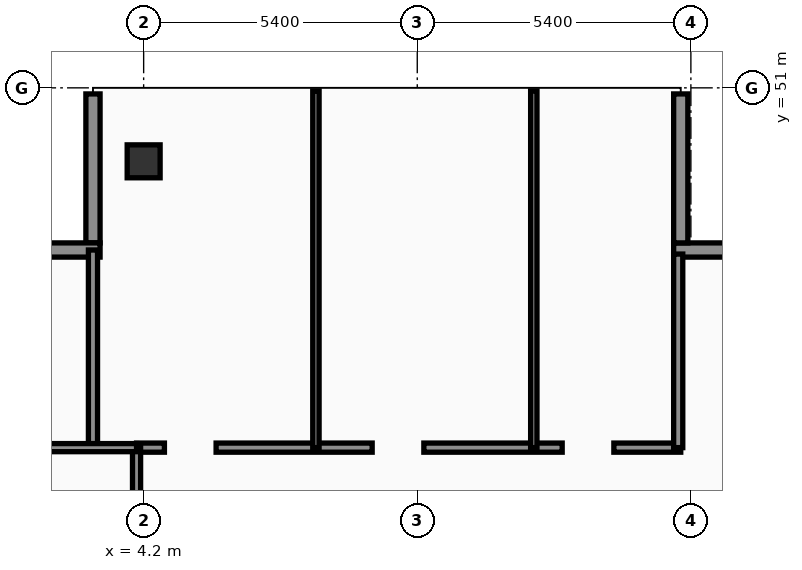
"""IFC4 building model, lengths in metres.
Left out: names, types, materials, properties, quantities, classifications, styles, units other than length and angle.
Written with IfcOpenShell. Run it as: python <this file> out.ifc"""

import sys

from ifc_helpers import new_model, si_unit, direction, frame, frame_2d, origin, origin_2d, place, context, subcontext, project, spatial, rectangle, hollow_rectangle, extrude, element, fill, save


model = new_model("IFC4")
c1 = context("Model", 3, precision=1e-05, world=origin(), true_north=direction((0.0, 1.0)))
c2 = subcontext(c1, "Body", "Model", "MODEL_VIEW")
j1 = project(units=[si_unit("LENGTHUNIT", "METRE"), si_unit("PLANEANGLEUNIT", "RADIAN")], contexts=[c1])
p1 = place(None, origin())
s1 = spatial("IfcSite", under=j1, at=p1, CompositionType="ELEMENT")
p2 = place(p1, origin())
s2 = spatial("IfcBuilding", under=s1, at=p2, CompositionType="ELEMENT")
p3 = place(p2, frame((0.0, 0.0, 311.5)))
s3 = spatial("IfcBuildingStorey", under=s2, at=p3, CompositionType="ELEMENT", Elevation=311.5)
p4 = place(p3, frame((4.2, 49.55, 0.0), z_axis=(0.0, 0.0, 1.0), x_axis=(1.0, 0.0, 0.0)))
e1 = element("IfcColumn", 1, at=p4, inside=s3, PredefinedType="COLUMN", context=c2, shape_type="SweptSolid", body=[
    extrude(hollow_rectangle(XDim=0.65, YDim=0.65, WallThickness=0.028, at=origin_2d()), origin(), (0.0, 0.0, 1.0), 4.26),
])
p5 = place(p3, frame((17.9, 47.8, 0.0), z_axis=(0.0, 0.0, 1.0), x_axis=(-1.0, 0.0, 0.0)))
e2 = element("IfcWall", 2, at=p5, inside=s3, PredefinedType="SOLIDWALL", context=c2, shape_type="SweptSolid", body=[
    extrude(rectangle(XDim=3.24, YDim=0.28, at=frame_2d((1.62, 0.0))), origin(), (0.0, 0.0, 1.0), 4.26),
])
p6 = place(p3, frame((14.8, 47.94, 0.0), z_axis=(0.0, 0.0, 1.0), x_axis=(0.0, 1.0, 0.0)))
e3 = element("IfcWall", 3, at=p6, inside=s3, PredefinedType="SOLIDWALL", context=c2, shape_type="SweptSolid", body=[
    extrude(rectangle(XDim=2.94, YDim=0.28, at=frame_2d((1.47, 0.0))), origin(), (0.0, 0.0, 1.0), 4.26),
])
p7 = place(p3, frame((3.2, 50.88, 0.0), z_axis=(0.0, 0.0, 1.0), x_axis=(0.0, -1.0, 0.0)))
e4 = element("IfcWall", 4, at=p7, inside=s3, PredefinedType="SOLIDWALL", context=c2, shape_type="SweptSolid", body=[
    extrude(rectangle(XDim=2.94, YDim=0.28, at=frame_2d((1.47, 0.0))), origin(), (0.0, 0.0, 1.0), 3.79),
])
p8 = place(p3, frame((3.34, 47.8, 0.0), z_axis=(0.0, 0.0, 1.0), x_axis=(-1.0, 0.0, 0.0)))
e5 = element("IfcWall", 5, at=p8, inside=s3, PredefinedType="SOLIDWALL", context=c2, shape_type="SweptSolid", body=[
    extrude(rectangle(XDim=3.22, YDim=0.28, at=frame_2d((1.61, 0.0))), origin(), (0.0, 0.0, 1.0), 3.79),
])
p9 = place(p3, frame((3.2, 43.9, 0.0), z_axis=(0.0, 0.0, 1.0), x_axis=(0.0, 1.0, 0.0)))
e6 = element("IfcWall", 6, at=p9, inside=s3, PredefinedType="PARTITIONING", context=c2, shape_type="SweptSolid", body=[
    extrude(rectangle(XDim=3.9, YDim=0.18, at=frame_2d((1.95, 0.0))), origin(), (0.0, 0.0, 1.0), 4.26),
])
p10 = place(p3, frame((4.06, 43.9, 0.0), z_axis=(0.0, 0.0, 1.0), x_axis=(1.0, 0.0, 0.0)))
e7 = element("IfcWall", 7, at=p10, inside=s3, PredefinedType="PARTITIONING", context=c2, shape_type="SweptSolid", body=[
    extrude(rectangle(XDim=10.74, YDim=0.18, at=frame_2d((5.37, 0.0))), origin(), (0.0, 0.0, 1.0), 3.69),
])
p11 = place(p10, frame((0.55, 0.0, 0.0)))
e8 = element("IfcOpeningElement", 8, at=p11, cuts=e7, PredefinedType="OPENING", context=c2, shape_type="SweptSolid", body=[
    extrude(rectangle(XDim=1.02, YDim=2.2, at=frame_2d((0.51, 1.1))), frame((0.0, 0.1, 0.0), z_axis=(0.0, -1.0, 0.0), x_axis=(1.0, 0.0, 0.0)), (0.0, 0.0, 1.0), 0.2),
])
p12 = place(p10, frame((4.65, 0.0, 0.0)))
e9 = element("IfcOpeningElement", 9, at=p12, cuts=e7, PredefinedType="OPENING", context=c2, shape_type="SweptSolid", body=[
    extrude(rectangle(XDim=1.02, YDim=2.2, at=frame_2d((0.51, 1.1))), frame((0.0, 0.1, 0.0), z_axis=(0.0, -1.0, 0.0), x_axis=(1.0, 0.0, 0.0)), (0.0, 0.0, 1.0), 0.2),
])
p13 = place(p10, frame((8.4, 0.0, 0.0)))
e10 = element("IfcOpeningElement", 10, at=p13, cuts=e7, PredefinedType="OPENING", context=c2, shape_type="SweptSolid", body=[
    extrude(rectangle(XDim=1.02, YDim=2.2, at=frame_2d((0.51, 1.1))), frame((0.0, 0.1, 0.0), z_axis=(0.0, -1.0, 0.0), x_axis=(1.0, 0.0, 0.0)), (0.0, 0.0, 1.0), 0.2),
])
p14 = place(p3, frame((4.06, 38.4, 0.0), z_axis=(0.0, 0.0, 1.0), x_axis=(0.0, 1.0, 0.0)))
e11 = element("IfcWall", 11, at=p14, inside=s3, PredefinedType="PARTITIONING", context=c2, shape_type="SweptSolid", body=[
    extrude(rectangle(XDim=5.5, YDim=0.16, at=frame_2d((2.75, 0.0))), origin(), (0.0, 0.0, 1.0), 3.69),
])
p15 = place(p14, frame((3.2, 0.0, 0.0)))
e12 = element("IfcOpeningElement", 12, at=p15, cuts=e11, PredefinedType="OPENING", context=c2, shape_type="SweptSolid", body=[
    extrude(rectangle(XDim=1.02, YDim=2.2, at=frame_2d((0.51, 1.1))), frame((0.0, 0.09, 0.0), z_axis=(0.0, -1.0, 0.0), x_axis=(1.0, 0.0, 0.0)), (0.0, 0.0, 1.0), 0.18),
])
p16 = place(p3, frame((0.08, 43.9, 0.0), z_axis=(0.0, 0.0, 1.0), x_axis=(1.0, 0.0, 0.0)))
e13 = element("IfcWall", 13, at=p16, inside=s3, PredefinedType="PARTITIONING", context=c2, shape_type="SweptSolid", body=[
    extrude(rectangle(XDim=3.98, YDim=0.16, at=frame_2d((1.99, 0.0))), origin(), (0.0, 0.0, 1.0), 3.69),
])
p17 = place(p3, frame((14.75, 43.9, 0.0), z_axis=(0.0, 0.0, 1.0), x_axis=(0.0, 1.0, 0.0)))
e14 = element("IfcWall", 14, at=p17, inside=s3, PredefinedType="PARTITIONING", context=c2, shape_type="SweptSolid", body=[
    extrude(rectangle(XDim=3.82, YDim=0.18, at=frame_2d((1.91, 0.0))), origin(), (0.0, 0.0, 1.0), 3.79),
])
for number, where, z_axis, x_axis in (
    (15, (7.6, 43.9, 0.0), (0.0, 0.0, 1.0), (0.0, 1.0, 0.0)),
    (16, (11.9, 43.9, 0.0), (0.0, 0.0, 1.0), (0.0, 1.0, 0.0)),
):
    element("IfcWall", number, at=place(p3, frame(where, z_axis=z_axis, x_axis=x_axis)), inside=s3, PredefinedType="PARTITIONING", context=c2, shape_type="SweptSolid", body=[
        extrude(rectangle(XDim=7.04, YDim=0.125, at=frame_2d((3.52, 0.0))), origin(), (0.0, 0.0, 1.0), 3.79),
    ])
p18 = place(p11, origin())
e17 = element("IfcDoor", 17, at=p18, inside=s3, OperationType="SINGLE_SWING_LEFT", PredefinedType="DOOR", context=c2, shape_type="SweptSolid", body=[
    extrude(rectangle(XDim=1.02, YDim=2.2, at=frame_2d((0.51, 1.1))), frame((0.0, 0.025, 0.0), z_axis=(0.0, -1.0, 0.0), x_axis=(1.0, 0.0, 0.0)), (0.0, 0.0, 1.0), 0.05),
])
fill(e8, e17)
p19 = place(p12, origin())
e18 = element("IfcDoor", 18, at=p19, inside=s3, OperationType="SINGLE_SWING_RIGHT", PredefinedType="DOOR", context=c2, shape_type="SweptSolid", body=[
    extrude(rectangle(XDim=1.02, YDim=2.2, at=frame_2d((0.51, 1.1))), frame((0.0, 0.025, 0.0), z_axis=(0.0, -1.0, 0.0), x_axis=(1.0, 0.0, 0.0)), (0.0, 0.0, 1.0), 0.05),
])
fill(e9, e18)
p20 = place(p13, origin())
e19 = element("IfcDoor", 19, at=p20, inside=s3, OperationType="SINGLE_SWING_LEFT", PredefinedType="DOOR", context=c2, shape_type="SweptSolid", body=[
    extrude(rectangle(XDim=1.02, YDim=2.2, at=frame_2d((0.51, 1.1))), frame((0.0, 0.025, 0.0), z_axis=(0.0, -1.0, 0.0), x_axis=(1.0, 0.0, 0.0)), (0.0, 0.0, 1.0), 0.05),
])
fill(e10, e19)
save(model, sys.argv[1])
